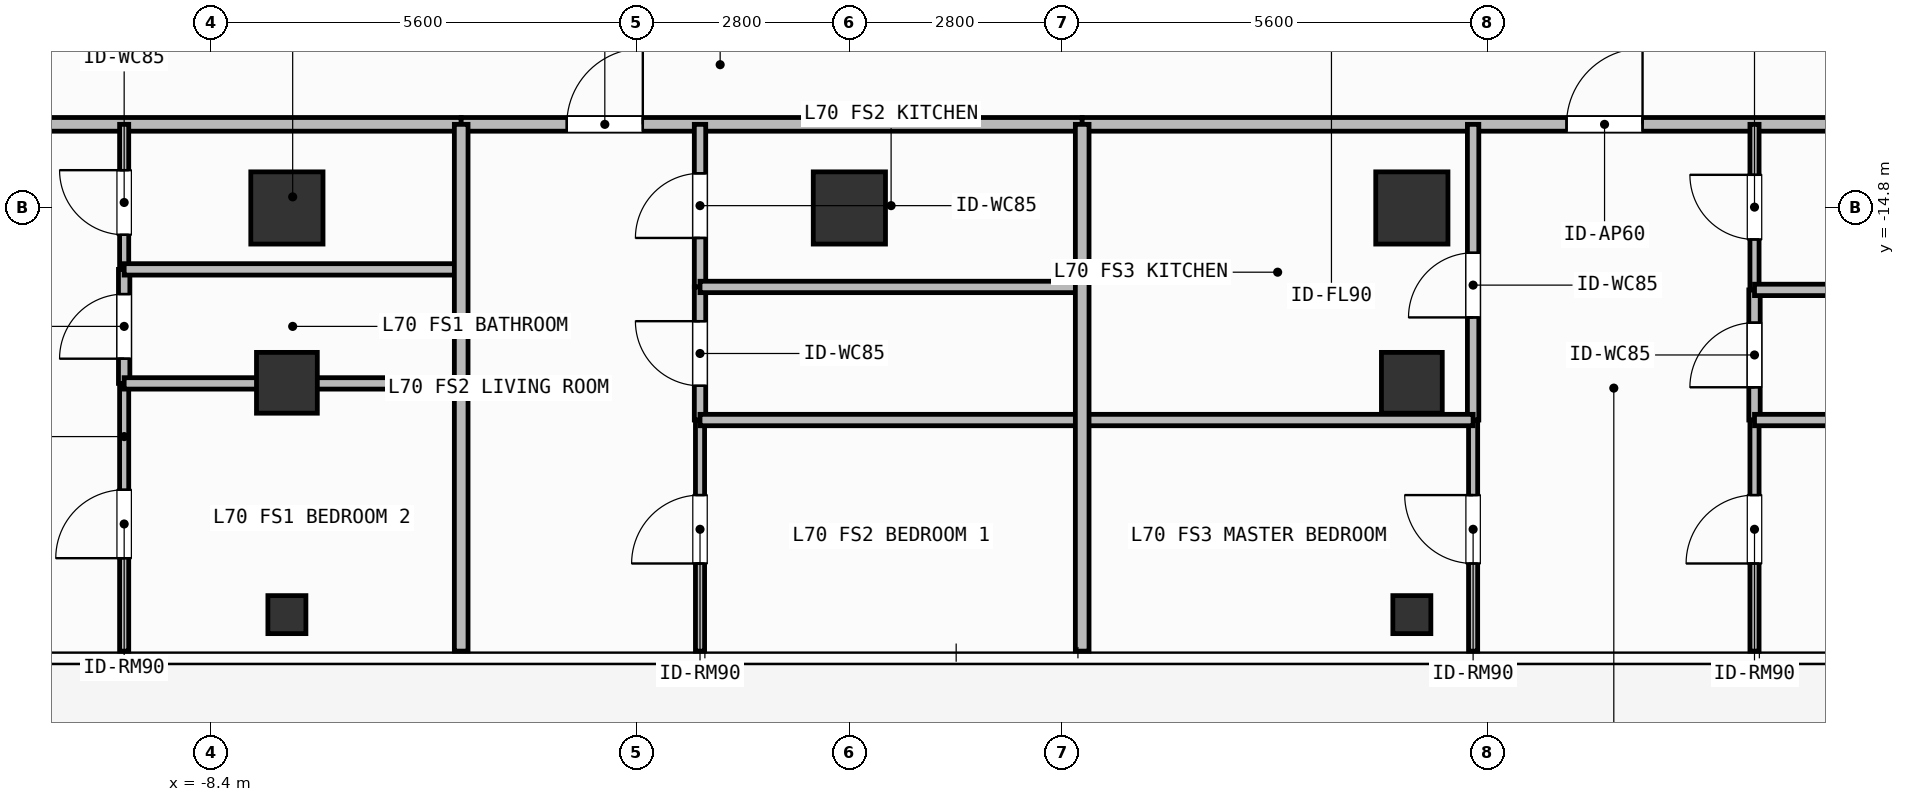
"""IFC4 building model, lengths in metres.
Left out: names, types, materials, properties, quantities, classifications, styles, units other than length and angle.
Written with IfcOpenShell. Run it as: python <this file> out.ifc"""

import sys

from ifc_helpers import new_model, si_unit, direction, frame, frame_2d, origin, origin_2d, place, context, subcontext, project, spatial, rectangle, hollow_rectangle, extrude, element, fill, save


model = new_model("IFC4")
c1 = context("Model", 3, precision=1e-05, world=origin(), true_north=direction((0.0, 1.0)))
c2 = subcontext(c1, "Body", "Model", "MODEL_VIEW")
j1 = project(units=[si_unit("LENGTHUNIT", "METRE"), si_unit("PLANEANGLEUNIT", "RADIAN")], contexts=[c1])
p1 = place(None, origin())
s1 = spatial("IfcSite", under=j1, at=p1, CompositionType="ELEMENT")
p2 = place(p1, origin())
s2 = spatial("IfcBuilding", under=s1, at=p2, CompositionType="ELEMENT")
p3 = place(p2, frame((0.0, 0.0, 285.9)))
s3 = spatial("IfcBuildingStorey", under=s2, at=p3, CompositionType="ELEMENT", Elevation=285.9)
for number, where, z_axis, x_axis in (
    (1, (-7.4, -14.8, 0.0), (0.0, 0.0, 1.0), (1.0, 0.0, 0.0)),
    (2, (0.0, -14.8, 0.0), (0.0, 0.0, 1.0), (1.0, 0.0, 0.0)),
    (3, (7.4, -14.8, 0.0), (0.0, 0.0, 1.0), (1.0, 0.0, 0.0)),
):
    element("IfcColumn", number, at=place(p3, frame(where, z_axis=z_axis, x_axis=x_axis)), inside=s3, PredefinedType="COLUMN", context=c2, shape_type="SweptSolid", body=[
        extrude(rectangle(XDim=0.95, YDim=0.95, at=origin_2d()), origin(), (0.0, 0.0, 1.0), 3.9),
    ])
for number, where, z_axis, x_axis in (
    (4, (-7.4, -17.1, 0.0), (0.0, 0.0, 1.0), (1.0, 0.0, 0.0)),
    (5, (7.4, -17.1, 0.0), (0.0, 0.0, 1.0), (1.0, 0.0, 0.0)),
):
    element("IfcColumn", number, at=place(p3, frame(where, z_axis=z_axis, x_axis=x_axis)), inside=s3, PredefinedType="COLUMN", context=c2, shape_type="SweptSolid", body=[
        extrude(hollow_rectangle(XDim=0.8, YDim=0.8, WallThickness=0.036, at=origin_2d()), origin(), (0.0, 0.0, 1.0), 3.9),
    ])
for number, where, z_axis, x_axis in (
    (6, (-7.4, -20.15, 0.0), (0.0, 0.0, 1.0), (1.0, 0.0, 0.0)),
    (7, (7.4, -20.15, 0.0), (0.0, 0.0, 1.0), (1.0, 0.0, 0.0)),
):
    element("IfcColumn", number, at=place(p3, frame(where, z_axis=z_axis, x_axis=x_axis)), inside=s3, PredefinedType="COLUMN", context=c2, shape_type="SweptSolid", body=[
        extrude(hollow_rectangle(XDim=0.5, YDim=0.5, WallThickness=0.025, at=origin_2d()), origin(), (0.0, 0.0, 1.0), 3.9),
    ])
p4 = place(p3, frame((-19.32, -13.7, 0.0), z_axis=(0.0, 0.0, 1.0), x_axis=(1.0, 0.0, 0.0)))
e8 = element("IfcWall", 8, at=p4, inside=s3, PredefinedType="PARTITIONING", context=c2, shape_type="SweptSolid", body=[
    extrude(rectangle(XDim=14.213, YDim=0.18, at=frame_2d((7.106, 0.0))), origin(), (0.0, 0.0, 1.0), 3.68),
])
p5 = place(p4, frame((6.069, 0.0, 0.0)))
e9 = element("IfcOpeningElement", 9, at=p5, cuts=e8, PredefinedType="OPENING", context=c2, shape_type="SweptSolid", body=[
    extrude(rectangle(XDim=1.0, YDim=2.2, at=frame_2d((0.5, 1.1))), frame((0.0, 0.1, 0.0), z_axis=(0.0, -1.0, 0.0), x_axis=(1.0, 0.0, 0.0)), (0.0, 0.0, 1.0), 0.2),
])
p6 = place(p3, frame((-9.541, -17.108, 0.0), z_axis=(0.0, 0.0, 1.0), x_axis=(0.0, 1.0, 0.0)))
e10 = element("IfcWall", 10, at=p6, inside=s3, PredefinedType="PARTITIONING", context=c2, shape_type="SweptSolid", body=[
    extrude(rectangle(XDim=1.5, YDim=0.15, at=frame_2d((0.75, 0.0))), origin(), (0.0, 0.0, 1.0), 3.68),
])
p7 = place(p6, frame((0.325, 0.0, 0.0)))
e11 = element("IfcOpeningElement", 11, at=p7, cuts=e10, PredefinedType="OPENING", context=c2, shape_type="SweptSolid", body=[
    extrude(rectangle(XDim=0.85, YDim=2.1, at=frame_2d((0.425, 1.05))), frame((0.0, 0.085, 0.0), z_axis=(0.0, -1.0, 0.0), x_axis=(1.0, 0.0, 0.0)), (0.0, 0.0, 1.0), 0.17),
])
p8 = place(p3, frame((-9.541, -15.608, 0.0), z_axis=(0.0, 0.0, 1.0), x_axis=(0.0, 1.0, 0.0)))
e12 = element("IfcWall", 12, at=p8, inside=s3, PredefinedType="PARTITIONING", context=c2, shape_type="SweptSolid", body=[
    extrude(rectangle(XDim=1.908, YDim=0.12, at=frame_2d((0.954, 0.0))), origin(), (0.0, 0.0, 1.0), 3.68),
])
p9 = place(p8, frame((0.455, 0.0, 0.0)))
e13 = element("IfcOpeningElement", 13, at=p9, cuts=e12, PredefinedType="OPENING", context=c2, shape_type="SweptSolid", body=[
    extrude(rectangle(XDim=0.85, YDim=2.1, at=frame_2d((0.425, 1.05))), frame((0.0, 0.07, 0.0), z_axis=(0.0, -1.0, 0.0), x_axis=(1.0, 0.0, 0.0)), (0.0, 0.0, 1.0), 0.14),
])
p10 = place(p3, frame((-9.541, -20.63, 0.0), z_axis=(0.0, 0.0, 1.0), x_axis=(0.0, 1.0, 0.0)))
e14 = element("IfcWall", 14, at=p10, inside=s3, PredefinedType="PARTITIONING", context=c2, shape_type="SweptSolid", body=[
    extrude(rectangle(XDim=3.522, YDim=0.12, at=frame_2d((1.761, 0.0))), origin(), (0.0, 0.0, 1.0), 3.68),
])
p11 = place(p10, frame((1.222, 0.0, 0.0)))
e15 = element("IfcOpeningElement", 15, at=p11, cuts=e14, PredefinedType="OPENING", context=c2, shape_type="SweptSolid", body=[
    extrude(rectangle(XDim=0.9, YDim=2.1, at=frame_2d((0.45, 1.05))), frame((0.0, 0.07, 0.0), z_axis=(0.0, -1.0, 0.0), x_axis=(1.0, 0.0, 0.0)), (0.0, 0.0, 1.0), 0.14),
])
p12 = place(p3, frame((-5.107, -13.7, 0.0), z_axis=(0.0, 0.0, 1.0), x_axis=(1.0, 0.0, 0.0)))
e16 = element("IfcWall", 16, at=p12, inside=s3, PredefinedType="PARTITIONING", context=c2, shape_type="SweptSolid", body=[
    extrude(rectangle(XDim=8.17, YDim=0.18, at=frame_2d((4.085, 0.0))), origin(), (0.0, 0.0, 1.0), 3.68),
])
p13 = place(p12, frame((1.389, 0.0, 0.0)))
e17 = element("IfcOpeningElement", 17, at=p13, cuts=e16, PredefinedType="OPENING", context=c2, shape_type="SweptSolid", body=[
    extrude(rectangle(XDim=1.0, YDim=2.2, at=frame_2d((0.5, 1.1))), frame((0.0, 0.1, 0.0), z_axis=(0.0, -1.0, 0.0), x_axis=(1.0, 0.0, 0.0)), (0.0, 0.0, 1.0), 0.2),
])
p14 = place(p3, frame((-1.965, -15.839, 0.0), z_axis=(0.0, 0.0, 1.0), x_axis=(0.0, 1.0, 0.0)))
e18 = element("IfcWall", 18, at=p14, inside=s3, PredefinedType="PARTITIONING", context=c2, shape_type="SweptSolid", body=[
    extrude(rectangle(XDim=2.139, YDim=0.15, at=frame_2d((1.07, 0.0))), origin(), (0.0, 0.0, 1.0), 3.68),
])
p15 = place(p14, frame((0.645, 0.0, 0.0)))
e19 = element("IfcOpeningElement", 19, at=p15, cuts=e18, PredefinedType="OPENING", context=c2, shape_type="SweptSolid", body=[
    extrude(rectangle(XDim=0.85, YDim=2.1, at=frame_2d((0.425, 1.05))), frame((0.0, 0.085, 0.0), z_axis=(0.0, -1.0, 0.0), x_axis=(1.0, 0.0, 0.0)), (0.0, 0.0, 1.0), 0.17),
])
p16 = place(p3, frame((-1.965, -17.59, 0.0), z_axis=(0.0, 0.0, 1.0), x_axis=(0.0, 1.0, 0.0)))
e20 = element("IfcWall", 20, at=p16, inside=s3, PredefinedType="PARTITIONING", context=c2, shape_type="SweptSolid", body=[
    extrude(rectangle(XDim=1.751, YDim=0.15, at=frame_2d((0.875, 0.0))), origin(), (0.0, 0.0, 1.0), 3.68),
])
p17 = place(p16, frame((0.45, 0.0, 0.0)))
e21 = element("IfcOpeningElement", 21, at=p17, cuts=e20, PredefinedType="OPENING", context=c2, shape_type="SweptSolid", body=[
    extrude(rectangle(XDim=0.85, YDim=2.1, at=frame_2d((0.425, 1.05))), frame((0.0, 0.085, 0.0), z_axis=(0.0, -1.0, 0.0), x_axis=(1.0, 0.0, 0.0)), (0.0, 0.0, 1.0), 0.17),
])
p18 = place(p3, frame((-1.965, -20.63, 0.0), z_axis=(0.0, 0.0, 1.0), x_axis=(0.0, 1.0, 0.0)))
e22 = element("IfcWall", 22, at=p18, inside=s3, PredefinedType="PARTITIONING", context=c2, shape_type="SweptSolid", body=[
    extrude(rectangle(XDim=3.04, YDim=0.12, at=frame_2d((1.52, 0.0))), origin(), (0.0, 0.0, 1.0), 3.68),
])
p19 = place(p18, frame((1.153, 0.0, 0.0)))
e23 = element("IfcOpeningElement", 23, at=p19, cuts=e22, PredefinedType="OPENING", context=c2, shape_type="SweptSolid", body=[
    extrude(rectangle(XDim=0.9, YDim=2.1, at=frame_2d((0.45, 1.05))), frame((0.0, 0.07, 0.0), z_axis=(0.0, -1.0, 0.0), x_axis=(1.0, 0.0, 0.0)), (0.0, 0.0, 1.0), 0.14),
])
p20 = place(p3, frame((3.063, -13.7, 0.0), z_axis=(0.0, 0.0, 1.0), x_axis=(1.0, 0.0, 0.0)))
e24 = element("IfcWall", 24, at=p20, inside=s3, PredefinedType="PARTITIONING", context=c2, shape_type="SweptSolid", body=[
    extrude(rectangle(XDim=12.857, YDim=0.18, at=frame_2d((6.428, 0.0))), origin(), (0.0, 0.0, 1.0), 3.68),
])
p21 = place(p20, frame((6.372, 0.0, 0.0)))
e25 = element("IfcOpeningElement", 25, at=p21, cuts=e24, PredefinedType="OPENING", context=c2, shape_type="SweptSolid", body=[
    extrude(rectangle(XDim=1.0, YDim=2.2, at=frame_2d((0.5, 1.1))), frame((0.0, 0.1, 0.0), z_axis=(0.0, -1.0, 0.0), x_axis=(1.0, 0.0, 0.0)), (0.0, 0.0, 1.0), 0.2),
])
p22 = place(p3, frame((8.206, -17.59, 0.0), z_axis=(0.0, 0.0, 1.0), x_axis=(0.0, 1.0, 0.0)))
e26 = element("IfcWall", 26, at=p22, inside=s3, PredefinedType="PARTITIONING", context=c2, shape_type="SweptSolid", body=[
    extrude(rectangle(XDim=3.89, YDim=0.15, at=frame_2d((1.945, 0.0))), origin(), (0.0, 0.0, 1.0), 3.68),
])
p23 = place(p22, frame((1.35, 0.0, 0.0)))
e27 = element("IfcOpeningElement", 27, at=p23, cuts=e26, PredefinedType="OPENING", context=c2, shape_type="SweptSolid", body=[
    extrude(rectangle(XDim=0.85, YDim=2.1, at=frame_2d((0.425, 1.05))), frame((0.0, 0.085, 0.0), z_axis=(0.0, -1.0, 0.0), x_axis=(1.0, 0.0, 0.0)), (0.0, 0.0, 1.0), 0.17),
])
p24 = place(p3, frame((8.206, -20.63, 0.0), z_axis=(0.0, 0.0, 1.0), x_axis=(0.0, 1.0, 0.0)))
e28 = element("IfcWall", 28, at=p24, inside=s3, PredefinedType="PARTITIONING", context=c2, shape_type="SweptSolid", body=[
    extrude(rectangle(XDim=3.04, YDim=0.12, at=frame_2d((1.52, 0.0))), origin(), (0.0, 0.0, 1.0), 3.68),
])
p25 = place(p24, frame((1.153, 0.0, 0.0)))
e29 = element("IfcOpeningElement", 29, at=p25, cuts=e28, PredefinedType="OPENING", context=c2, shape_type="SweptSolid", body=[
    extrude(rectangle(XDim=0.9, YDim=2.1, at=frame_2d((0.45, 1.05))), frame((0.0, 0.07, 0.0), z_axis=(0.0, -1.0, 0.0), x_axis=(1.0, 0.0, 0.0)), (0.0, 0.0, 1.0), 0.14),
])
p26 = place(p3, frame((11.908, -17.59, 0.0), z_axis=(0.0, 0.0, 1.0), x_axis=(0.0, 1.0, 0.0)))
e30 = element("IfcWall", 30, at=p26, inside=s3, PredefinedType="PARTITIONING", context=c2, shape_type="SweptSolid", body=[
    extrude(rectangle(XDim=1.712, YDim=0.15, at=frame_2d((0.856, 0.0))), origin(), (0.0, 0.0, 1.0), 3.68),
])
p27 = place(p26, frame((0.431, 0.0, 0.0)))
e31 = element("IfcOpeningElement", 31, at=p27, cuts=e30, PredefinedType="OPENING", context=c2, shape_type="SweptSolid", body=[
    extrude(rectangle(XDim=0.85, YDim=2.1, at=frame_2d((0.425, 1.05))), frame((0.0, 0.085, 0.0), z_axis=(0.0, -1.0, 0.0), x_axis=(1.0, 0.0, 0.0)), (0.0, 0.0, 1.0), 0.17),
])
p28 = place(p3, frame((11.908, -15.878, 0.0), z_axis=(0.0, 0.0, 1.0), x_axis=(0.0, 1.0, 0.0)))
e32 = element("IfcWall", 32, at=p28, inside=s3, PredefinedType="PARTITIONING", context=c2, shape_type="SweptSolid", body=[
    extrude(rectangle(XDim=2.178, YDim=0.12, at=frame_2d((1.089, 0.0))), origin(), (0.0, 0.0, 1.0), 3.68),
])
p29 = place(p28, frame((0.664, 0.0, 0.0)))
e33 = element("IfcOpeningElement", 33, at=p29, cuts=e32, PredefinedType="OPENING", context=c2, shape_type="SweptSolid", body=[
    extrude(rectangle(XDim=0.85, YDim=2.1, at=frame_2d((0.425, 1.05))), frame((0.0, 0.07, 0.0), z_axis=(0.0, -1.0, 0.0), x_axis=(1.0, 0.0, 0.0)), (0.0, 0.0, 1.0), 0.14),
])
p30 = place(p3, frame((11.908, -20.63, 0.0), z_axis=(0.0, 0.0, 1.0), x_axis=(0.0, 1.0, 0.0)))
e34 = element("IfcWall", 34, at=p30, inside=s3, PredefinedType="PARTITIONING", context=c2, shape_type="SweptSolid", body=[
    extrude(rectangle(XDim=3.04, YDim=0.12, at=frame_2d((1.52, 0.0))), origin(), (0.0, 0.0, 1.0), 3.68),
])
p31 = place(p30, frame((1.153, 0.0, 0.0)))
e35 = element("IfcOpeningElement", 35, at=p31, cuts=e34, PredefinedType="OPENING", context=c2, shape_type="SweptSolid", body=[
    extrude(rectangle(XDim=0.9, YDim=2.1, at=frame_2d((0.45, 1.05))), frame((0.0, 0.07, 0.0), z_axis=(0.0, -1.0, 0.0), x_axis=(1.0, 0.0, 0.0)), (0.0, 0.0, 1.0), 0.14),
])
p32 = place(p3, frame((-9.541, -15.608, 0.0), z_axis=(0.0, 0.0, 1.0), x_axis=(1.0, 0.0, 0.0)))
e36 = element("IfcWall", 36, at=p32, inside=s3, PredefinedType="PARTITIONING", context=c2, shape_type="SweptSolid", body=[
    extrude(rectangle(XDim=4.434, YDim=0.15, at=frame_2d((2.217, 0.0))), origin(), (0.0, 0.0, 1.0), 3.68),
])
p33 = place(p3, frame((-9.541, -17.108, 0.0), z_axis=(0.0, 0.0, 1.0), x_axis=(1.0, 0.0, 0.0)))
e37 = element("IfcWall", 37, at=p33, inside=s3, PredefinedType="PARTITIONING", context=c2, shape_type="SweptSolid", body=[
    extrude(rectangle(XDim=4.434, YDim=0.15, at=frame_2d((2.217, 0.0))), origin(), (0.0, 0.0, 1.0), 3.182),
])
for number, where, z_axis, x_axis in (
    (38, (-1.965, -15.839, 0.0), (0.0, 0.0, 1.0), (1.0, 0.0, 0.0)),
    (39, (-1.965, -17.59, 0.0), (0.0, 0.0, 1.0), (1.0, 0.0, 0.0)),
):
    element("IfcWall", number, at=place(p3, frame(where, z_axis=z_axis, x_axis=x_axis)), inside=s3, PredefinedType="PARTITIONING", context=c2, shape_type="SweptSolid", body=[
        extrude(rectangle(XDim=5.028, YDim=0.15, at=frame_2d((2.514, 0.0))), origin(), (0.0, 0.0, 1.0), 3.68),
    ])
p34 = place(p3, frame((-5.107, -20.63, 0.0), z_axis=(0.0, 0.0, 1.0), x_axis=(0.0, 1.0, 0.0)))
e40 = element("IfcWall", 40, at=p34, inside=s3, PredefinedType="PARTITIONING", context=c2, shape_type="SweptSolid", body=[
    extrude(rectangle(XDim=6.93, YDim=0.18, at=frame_2d((3.465, 0.0))), origin(), (0.0, 0.0, 1.0), 3.68),
])
p35 = place(p3, frame((3.063, -17.59, 0.0), z_axis=(0.0, 0.0, 1.0), x_axis=(1.0, 0.0, 0.0)))
e41 = element("IfcWall", 41, at=p35, inside=s3, PredefinedType="PARTITIONING", context=c2, shape_type="SweptSolid", body=[
    extrude(rectangle(XDim=5.143, YDim=0.15, at=frame_2d((2.572, 0.0))), origin(), (0.0, 0.0, 1.0), 3.68),
])
for number, where, z_axis, x_axis in (
    (42, (11.908, -15.878, 0.0), (0.0, 0.0, 1.0), (1.0, 0.0, 0.0)),
    (43, (11.908, -17.59, 0.0), (0.0, 0.0, 1.0), (1.0, 0.0, 0.0)),
):
    element("IfcWall", number, at=place(p3, frame(where, z_axis=z_axis, x_axis=x_axis)), inside=s3, PredefinedType="PARTITIONING", context=c2, shape_type="SweptSolid", body=[
        extrude(rectangle(XDim=4.012, YDim=0.15, at=frame_2d((2.006, 0.0))), origin(), (0.0, 0.0, 1.0), 3.68),
    ])
p36 = place(p3, frame((3.063, -20.63, 0.0), z_axis=(0.0, 0.0, 1.0), x_axis=(0.0, 1.0, 0.0)))
e44 = element("IfcWall", 44, at=p36, inside=s3, PredefinedType="PARTITIONING", context=c2, shape_type="SweptSolid", body=[
    extrude(rectangle(XDim=6.93, YDim=0.18, at=frame_2d((3.465, 0.0))), origin(), (0.0, 0.0, 1.0), 3.68),
])
p37 = place(p7, origin())
e45 = element("IfcDoor", 45, at=p37, inside=s3, OperationType="SINGLE_SWING_LEFT", PredefinedType="DOOR", context=c2, shape_type="SweptSolid", body=[
    extrude(rectangle(XDim=0.85, YDim=2.1, at=frame_2d((0.425, 1.05))), frame((0.0, 0.025, 0.0), z_axis=(0.0, -1.0, 0.0), x_axis=(1.0, 0.0, 0.0)), (0.0, 0.0, 1.0), 0.05),
])
fill(e11, e45)
p38 = place(p9, origin())
e46 = element("IfcDoor", 46, at=p38, inside=s3, OperationType="SINGLE_SWING_RIGHT", PredefinedType="DOOR", context=c2, shape_type="SweptSolid", body=[
    extrude(rectangle(XDim=0.85, YDim=2.1, at=frame_2d((0.425, 1.05))), frame((0.0, 0.025, 0.0), z_axis=(0.0, -1.0, 0.0), x_axis=(1.0, 0.0, 0.0)), (0.0, 0.0, 1.0), 0.05),
])
fill(e13, e46)
p39 = place(p11, origin())
e47 = element("IfcDoor", 47, at=p39, inside=s3, OperationType="SINGLE_SWING_LEFT", PredefinedType="DOOR", context=c2, shape_type="SweptSolid", body=[
    extrude(rectangle(XDim=0.9, YDim=2.1, at=frame_2d((0.45, 1.05))), frame((0.0, 0.025, 0.0), z_axis=(0.0, -1.0, 0.0), x_axis=(1.0, 0.0, 0.0)), (0.0, 0.0, 1.0), 0.05),
])
fill(e15, e47)
p40 = place(p13, origin())
e48 = element("IfcDoor", 48, at=p40, inside=s3, OperationType="SINGLE_SWING_RIGHT", PredefinedType="DOOR", context=c2, shape_type="SweptSolid", body=[
    extrude(rectangle(XDim=1.0, YDim=2.2, at=frame_2d((0.5, 1.1))), frame((0.0, 0.025, 0.0), z_axis=(0.0, -1.0, 0.0), x_axis=(1.0, 0.0, 0.0)), (0.0, 0.0, 1.0), 0.05),
])
fill(e17, e48)
p41 = place(p15, origin())
e49 = element("IfcDoor", 49, at=p41, inside=s3, OperationType="SINGLE_SWING_LEFT", PredefinedType="DOOR", context=c2, shape_type="SweptSolid", body=[
    extrude(rectangle(XDim=0.85, YDim=2.1, at=frame_2d((0.425, 1.05))), frame((0.0, 0.025, 0.0), z_axis=(0.0, -1.0, 0.0), x_axis=(1.0, 0.0, 0.0)), (0.0, 0.0, 1.0), 0.05),
])
fill(e19, e49)
p42 = place(p17, origin())
e50 = element("IfcDoor", 50, at=p42, inside=s3, OperationType="SINGLE_SWING_RIGHT", PredefinedType="DOOR", context=c2, shape_type="SweptSolid", body=[
    extrude(rectangle(XDim=0.85, YDim=2.1, at=frame_2d((0.425, 1.05))), frame((0.0, 0.025, 0.0), z_axis=(0.0, -1.0, 0.0), x_axis=(1.0, 0.0, 0.0)), (0.0, 0.0, 1.0), 0.05),
])
fill(e21, e50)
p43 = place(p19, origin())
e51 = element("IfcDoor", 51, at=p43, inside=s3, OperationType="SINGLE_SWING_LEFT", PredefinedType="DOOR", context=c2, shape_type="SweptSolid", body=[
    extrude(rectangle(XDim=0.9, YDim=2.1, at=frame_2d((0.45, 1.05))), frame((0.0, 0.025, 0.0), z_axis=(0.0, -1.0, 0.0), x_axis=(1.0, 0.0, 0.0)), (0.0, 0.0, 1.0), 0.05),
])
fill(e23, e51)
p44 = place(p21, origin())
e52 = element("IfcDoor", 52, at=p44, inside=s3, OperationType="SINGLE_SWING_RIGHT", PredefinedType="DOOR", context=c2, shape_type="SweptSolid", body=[
    extrude(rectangle(XDim=1.0, YDim=2.2, at=frame_2d((0.5, 1.1))), frame((0.0, 0.025, 0.0), z_axis=(0.0, -1.0, 0.0), x_axis=(1.0, 0.0, 0.0)), (0.0, 0.0, 1.0), 0.05),
])
fill(e25, e52)
p45 = place(p23, origin())
e53 = element("IfcDoor", 53, at=p45, inside=s3, OperationType="SINGLE_SWING_LEFT", PredefinedType="DOOR", context=c2, shape_type="SweptSolid", body=[
    extrude(rectangle(XDim=0.85, YDim=2.1, at=frame_2d((0.425, 1.05))), frame((0.0, 0.025, 0.0), z_axis=(0.0, -1.0, 0.0), x_axis=(1.0, 0.0, 0.0)), (0.0, 0.0, 1.0), 0.05),
])
fill(e27, e53)
p46 = place(p25, origin())
e54 = element("IfcDoor", 54, at=p46, inside=s3, OperationType="SINGLE_SWING_RIGHT", PredefinedType="DOOR", context=c2, shape_type="SweptSolid", body=[
    extrude(rectangle(XDim=0.9, YDim=2.1, at=frame_2d((0.45, 1.05))), frame((0.0, 0.025, 0.0), z_axis=(0.0, -1.0, 0.0), x_axis=(1.0, 0.0, 0.0)), (0.0, 0.0, 1.0), 0.05),
])
fill(e29, e54)
p47 = place(p27, origin())
e55 = element("IfcDoor", 55, at=p47, inside=s3, OperationType="SINGLE_SWING_LEFT", PredefinedType="DOOR", context=c2, shape_type="SweptSolid", body=[
    extrude(rectangle(XDim=0.85, YDim=2.1, at=frame_2d((0.425, 1.05))), frame((0.0, 0.025, 0.0), z_axis=(0.0, -1.0, 0.0), x_axis=(1.0, 0.0, 0.0)), (0.0, 0.0, 1.0), 0.05),
])
fill(e31, e55)
p48 = place(p29, origin())
e56 = element("IfcDoor", 56, at=p48, inside=s3, OperationType="SINGLE_SWING_RIGHT", PredefinedType="DOOR", context=c2, shape_type="SweptSolid", body=[
    extrude(rectangle(XDim=0.85, YDim=2.1, at=frame_2d((0.425, 1.05))), frame((0.0, 0.025, 0.0), z_axis=(0.0, -1.0, 0.0), x_axis=(1.0, 0.0, 0.0)), (0.0, 0.0, 1.0), 0.05),
])
fill(e33, e56)
p49 = place(p31, origin())
e57 = element("IfcDoor", 57, at=p49, inside=s3, OperationType="SINGLE_SWING_LEFT", PredefinedType="DOOR", context=c2, shape_type="SweptSolid", body=[
    extrude(rectangle(XDim=0.9, YDim=2.1, at=frame_2d((0.45, 1.05))), frame((0.0, 0.025, 0.0), z_axis=(0.0, -1.0, 0.0), x_axis=(1.0, 0.0, 0.0)), (0.0, 0.0, 1.0), 0.05),
])
fill(e35, e57)
save(model, sys.argv[1])
